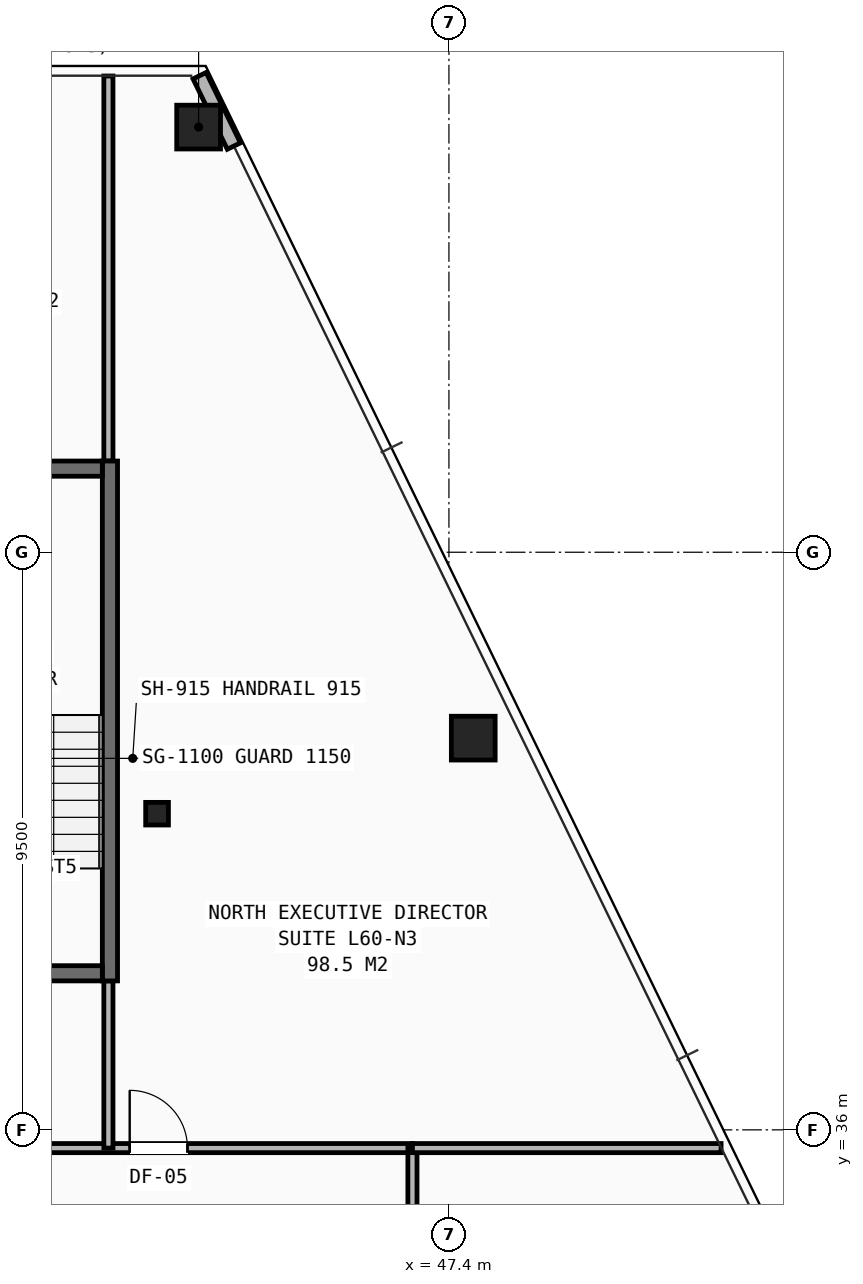
"""IFC4 building model, lengths in metres.
Left out: names, types, materials, properties, quantities, classifications, styles, units other than length and angle.
Written with IfcOpenShell. Run it as: python <this file> out.ifc"""

import sys

from ifc_helpers import new_model, si_unit, direction, frame, frame_2d, origin, origin_2d, place, context, subcontext, project, spatial, rectangle, hollow_rectangle, i_section, extrude, element, fill, save


model = new_model("IFC4")
c1 = context("Model", 3, precision=1e-05, world=origin(), true_north=direction((0.0, 1.0)))
c2 = subcontext(c1, "Body", "Model", "MODEL_VIEW")
j1 = project(units=[si_unit("LENGTHUNIT", "METRE"), si_unit("PLANEANGLEUNIT", "RADIAN")], contexts=[c1])
p1 = place(None, origin())
s1 = spatial("IfcSite", under=j1, at=p1, CompositionType="ELEMENT")
p2 = place(p1, origin())
s2 = spatial("IfcBuilding", under=s1, at=p2, CompositionType="ELEMENT")
p3 = place(p2, frame((0.0, 0.0, 211.9)))
s3 = spatial("IfcBuildingStorey", under=s2, at=p3, CompositionType="ELEMENT", Elevation=211.9)
p4 = place(p3, frame((42.6, 41.2, 0.0), z_axis=(0.0, 0.0, 1.0), x_axis=(1.0, 0.0, 0.0)))
e1 = element("IfcColumn", 1, at=p4, inside=s3, PredefinedType="COLUMN", context=c2, shape_type="SweptSolid", body=[
    extrude(i_section(OverallWidth=0.374, OverallDepth=0.372, WebThickness=0.016, FlangeThickness=0.026, at=origin_2d()), origin(), (0.0, 0.0, 1.0), 3.5),
])
for number, where, z_axis, x_axis in (
    (2, (43.283, 52.492, 0.0), (0.0, 0.0, 1.0), (1.0, 0.0, 0.0)),
    (3, (47.8, 42.443, 0.0), (0.0, 0.0, 1.0), (1.0, 0.0, 0.0)),
):
    element("IfcColumn", number, at=place(p3, frame(where, z_axis=z_axis, x_axis=x_axis)), inside=s3, PredefinedType="COLUMN", context=c2, shape_type="SweptSolid", body=[
        extrude(hollow_rectangle(XDim=0.72, YDim=0.72, WallThickness=0.05, at=origin_2d()), origin(), (0.0, 0.0, 1.0), 3.5),
    ])
p5 = place(p3, frame((43.863, 52.18, 0.0), z_axis=(0.0, 0.0, 1.0), x_axis=(-0.43755686859, 0.899190739915, 0.0)))
e4 = element("IfcWall", 4, at=p5, inside=s3, PredefinedType="SHEAR", context=c2, shape_type="SweptSolid", body=[
    extrude(rectangle(XDim=1.288, YDim=0.24, at=frame_2d((0.644, 0.0))), origin(), (0.0, 0.0, 1.0), 2.623),
])
p6 = place(p3, frame((40.75, 35.7, 0.0), z_axis=(0.0, 0.0, 1.0), x_axis=(1.0, 0.0, 0.0)))
e5 = element("IfcWall", 5, at=p6, inside=s3, PredefinedType="PARTITIONING", context=c2, shape_type="SweptSolid", body=[
    extrude(rectangle(XDim=6.05, YDim=0.15, at=frame_2d((3.025, 0.0))), origin(), (0.0, 0.0, 1.0), 3.25),
])
p7 = place(p6, frame((1.4, 0.0, 0.0)))
e6 = element("IfcOpeningElement", 6, at=p7, cuts=e5, PredefinedType="OPENING", context=c2, shape_type="SweptSolid", body=[
    extrude(rectangle(XDim=0.95, YDim=2.1, at=frame_2d((0.475, 1.05))), frame((0.0, 0.085, 0.0), z_axis=(0.0, -1.0, 0.0), x_axis=(1.0, 0.0, 0.0)), (0.0, 0.0, 1.0), 0.17),
])
p8 = place(p3, frame((46.8, 31.2, 0.0), z_axis=(0.0, 0.0, 1.0), x_axis=(0.0, 1.0, 0.0)))
e7 = element("IfcWall", 7, at=p8, inside=s3, PredefinedType="PARTITIONING", context=c2, shape_type="SweptSolid", body=[
    extrude(rectangle(XDim=4.5, YDim=0.15, at=frame_2d((2.25, 0.0))), origin(), (0.0, 0.0, 1.0), 2.978),
])
p9 = place(p3, frame((46.8, 35.7, 0.0), z_axis=(0.0, 0.0, 1.0), x_axis=(1.0, 0.0, 0.0)))
e8 = element("IfcWall", 8, at=p9, inside=s3, PredefinedType="PARTITIONING", context=c2, shape_type="SweptSolid", body=[
    extrude(rectangle(XDim=5.076, YDim=0.15, at=frame_2d((2.538, 0.0))), origin(), (0.0, 0.0, 1.0), 2.628),
])
p10 = place(p3, frame((41.8, 35.7, 0.0), z_axis=(0.0, 0.0, 1.0), x_axis=(0.0, 1.0, 0.0)))
e9 = element("IfcWall", 9, at=p10, inside=s3, PredefinedType="PARTITIONING", context=c2, shape_type="SweptSolid", body=[
    extrude(rectangle(XDim=2.75, YDim=0.15, at=frame_2d((1.375, 0.0))), origin(), (0.0, 0.0, 1.0), 3.25),
])
p11 = place(p3, frame((41.8, 47.0, 0.0), z_axis=(0.0, 0.0, 1.0), x_axis=(0.0, 1.0, 0.0)))
e10 = element("IfcWall", 10, at=p11, inside=s3, PredefinedType="PARTITIONING", context=c2, shape_type="SweptSolid", body=[
    extrude(rectangle(XDim=6.333, YDim=0.15, at=frame_2d((3.167, 0.0))), origin(), (0.0, 0.0, 1.0), 2.628),
])
p12 = place(p3, frame((41.825, 38.45, 0.0), z_axis=(0.0, 0.0, 1.0), x_axis=(0.0, 1.0, 0.0)))
e11 = element("IfcWall", 11, at=p12, inside=s3, PredefinedType="SHEAR", context=c2, shape_type="SweptSolid", body=[
    extrude(rectangle(XDim=8.55, YDim=0.25, at=frame_2d((4.275, 0.0))), origin(), (0.0, 0.0, 1.0), 3.25),
])
p13 = place(p3, frame((38.3, 38.575, 0.0), z_axis=(0.0, 0.0, 1.0), x_axis=(1.0, 0.0, 0.0)))
e12 = element("IfcWall", 12, at=p13, inside=s3, PredefinedType="SHEAR", context=c2, shape_type="SweptSolid", body=[
    extrude(rectangle(XDim=3.4, YDim=0.25, at=frame_2d((1.7, 0.0))), origin(), (0.0, 0.0, 1.0), 3.25),
])
p14 = place(p13, frame((1.225, 0.0, 0.0)))
e13 = element("IfcOpeningElement", 13, at=p14, cuts=e12, PredefinedType="OPENING", context=c2, shape_type="SweptSolid", body=[
    extrude(rectangle(XDim=0.95, YDim=2.1, at=frame_2d((0.475, 1.05))), frame((0.0, 0.135, 0.0), z_axis=(0.0, -1.0, 0.0), x_axis=(1.0, 0.0, 0.0)), (0.0, 0.0, 1.0), 0.27),
])
p15 = place(p3, frame((38.3, 46.875, 0.0), z_axis=(0.0, 0.0, 1.0), x_axis=(1.0, 0.0, 0.0)))
e14 = element("IfcWall", 14, at=p15, inside=s3, PredefinedType="SHEAR", context=c2, shape_type="SweptSolid", body=[
    extrude(rectangle(XDim=3.4, YDim=0.25, at=frame_2d((1.7, 0.0))), origin(), (0.0, 0.0, 1.0), 3.25),
])
p16 = place(p7, origin())
e15 = element("IfcDoor", 15, at=p16, inside=s3, OperationType="SINGLE_SWING_LEFT", PredefinedType="DOOR", context=c2, shape_type="SweptSolid", body=[
    extrude(rectangle(XDim=0.95, YDim=2.1, at=frame_2d((0.475, 1.05))), frame((0.0, 0.025, 0.0), z_axis=(0.0, -1.0, 0.0), x_axis=(1.0, 0.0, 0.0)), (0.0, 0.0, 1.0), 0.05),
])
fill(e6, e15)
save(model, sys.argv[1])
